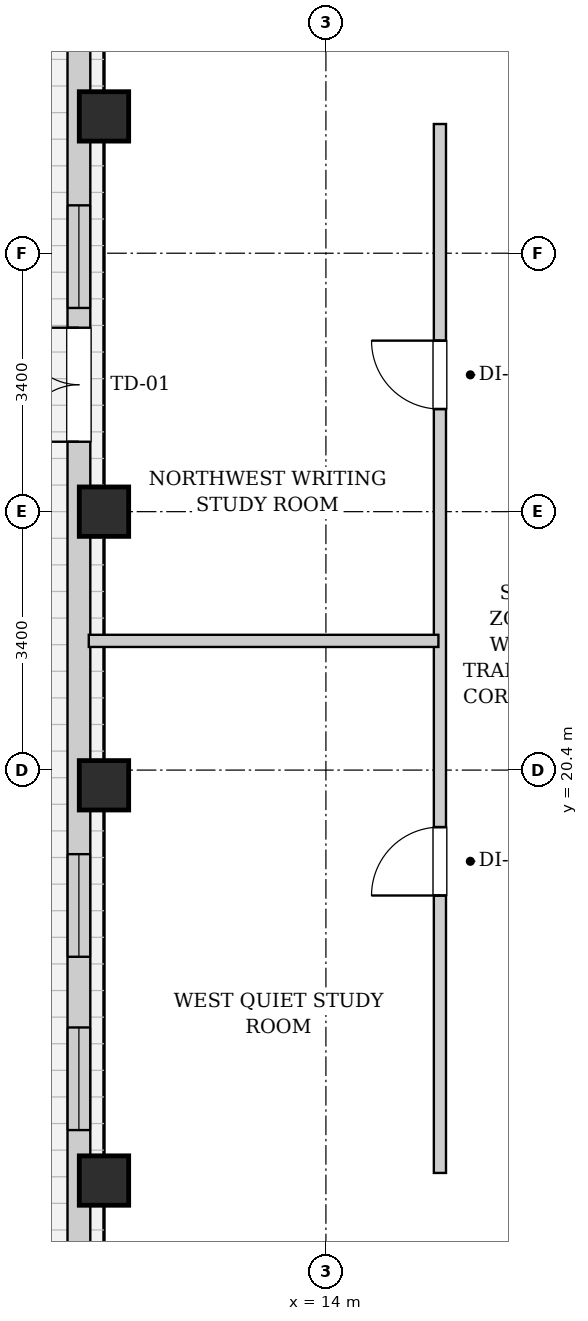
"""IFC4 building model, lengths in metres.
Left out: names, types, materials, properties, quantities, classifications, styles, units other than length and angle.
Written with IfcOpenShell. Run it as: python <this file> out.ifc"""

import sys

from ifc_helpers import new_model, si_unit, direction, frame, frame_2d, origin, origin_2d, place, context, subcontext, project, spatial, rectangle, extrude, element, fill, save


model = new_model("IFC4")
c1 = context("Model", 3, precision=1e-05, world=origin(), true_north=direction((0.0, 1.0)))
c2 = subcontext(c1, "Body", "Model", "MODEL_VIEW")
j1 = project(units=[si_unit("LENGTHUNIT", "METRE"), si_unit("PLANEANGLEUNIT", "RADIAN")], contexts=[c1])
p1 = place(None, origin())
s1 = spatial("IfcSite", under=j1, at=p1, CompositionType="ELEMENT")
p2 = place(p1, origin())
s2 = spatial("IfcBuilding", under=s1, at=p2, CompositionType="ELEMENT")
p3 = place(p2, frame((0.0, 0.0, 174.4)))
s3 = spatial("IfcBuildingStorey", under=s2, at=p3, CompositionType="ELEMENT", Elevation=174.4)
for number, where, z_axis, x_axis in (
    (1, (11.08, 15.0, 0.0), (0.0, 0.0, 1.0), (1.0, 0.0, 0.0)),
    (2, (11.08, 20.2, 0.0), (0.0, 0.0, 1.0), (1.0, 0.0, 0.0)),
    (3, (11.08, 23.8, 0.0), (0.0, 0.0, 1.0), (1.0, 0.0, 0.0)),
    (4, (11.08, 29.0, 0.0), (0.0, 0.0, 1.0), (1.0, 0.0, 0.0)),
):
    element("IfcColumn", number, at=place(p3, frame(where, z_axis=z_axis, x_axis=x_axis)), inside=s3, PredefinedType="COLUMN", context=c2, shape_type="SweptSolid", body=[
        extrude(rectangle(XDim=0.65, YDim=0.65, at=origin_2d()), origin(), (0.0, 0.0, 1.0), 3.3),
    ])
p4 = place(p3, frame((10.75, 6.3, 0.0), z_axis=(0.0, 0.0, 1.0), x_axis=(0.0, 1.0, 0.0)))
e5 = element("IfcWall", 5, at=p4, inside=s3, PredefinedType="SOLIDWALL", context=c2, shape_type="SweptSolid", body=[
    extrude(rectangle(XDim=31.4, YDim=0.3, at=frame_2d((15.7, 0.0))), origin(), (0.0, 0.0, 1.0), 3.04),
])
p5 = place(p4, frame((18.42, 0.0, 0.0)))
e6 = element("IfcOpeningElement", 6, at=p5, cuts=e5, PredefinedType="OPENING", context=c2, shape_type="SweptSolid", body=[
    extrude(rectangle(XDim=1.5, YDim=1.982, at=frame_2d((0.75, 0.991))), frame((0.0, 0.16, 0.0), z_axis=(0.0, -1.0, 0.0), x_axis=(1.0, 0.0, 0.0)), (0.0, 0.0, 1.0), 0.32),
])
p6 = place(p4, frame((11.644, 0.0, 0.55)))
e7 = element("IfcOpeningElement", 7, at=p6, cuts=e5, PredefinedType="OPENING", context=c2, shape_type="SweptSolid", body=[
    extrude(rectangle(XDim=1.35, YDim=1.2, at=frame_2d((0.675, 0.6))), frame((0.0, 0.16, 0.0), z_axis=(0.0, -1.0, 0.0), x_axis=(1.0, 0.0, 0.0)), (0.0, 0.0, 1.0), 0.32),
])
p7 = place(p4, frame((9.364, 0.0, 0.55)))
e8 = element("IfcOpeningElement", 8, at=p7, cuts=e5, PredefinedType="OPENING", context=c2, shape_type="SweptSolid", body=[
    extrude(rectangle(XDim=1.35, YDim=1.2, at=frame_2d((0.675, 0.6))), frame((0.0, 0.16, 0.0), z_axis=(0.0, -1.0, 0.0), x_axis=(1.0, 0.0, 0.0)), (0.0, 0.0, 1.0), 0.32),
])
p8 = place(p4, frame((20.18, 0.0, 0.55)))
e9 = element("IfcOpeningElement", 9, at=p8, cuts=e5, PredefinedType="OPENING", context=c2, shape_type="SweptSolid", body=[
    extrude(rectangle(XDim=1.35, YDim=1.2, at=frame_2d((0.675, 0.6))), frame((0.0, 0.16, 0.0), z_axis=(0.0, -1.0, 0.0), x_axis=(1.0, 0.0, 0.0)), (0.0, 0.0, 1.0), 0.32),
])
p9 = place(p3, frame((15.5, 15.1, 0.0), z_axis=(0.0, 0.0, 1.0), x_axis=(0.0, 1.0, 0.0)))
e10 = element("IfcWall", 10, at=p9, inside=s3, PredefinedType="PARTITIONING", context=c2, shape_type="SweptSolid", body=[
    extrude(rectangle(XDim=13.8, YDim=0.16, at=frame_2d((6.9, 0.0))), origin(), (0.0, 0.0, 1.0), 3.04),
])
p10 = place(p9, frame((3.65, 0.0, 0.0)))
e11 = element("IfcOpeningElement", 11, at=p10, cuts=e10, PredefinedType="OPENING", context=c2, shape_type="SweptSolid", body=[
    extrude(rectangle(XDim=0.9, YDim=2.05, at=frame_2d((0.45, 1.025))), frame((0.0, 0.09, 0.0), z_axis=(0.0, -1.0, 0.0), x_axis=(1.0, 0.0, 0.0)), (0.0, 0.0, 1.0), 0.18),
])
p11 = place(p9, frame((10.05, 0.0, 0.0)))
e12 = element("IfcOpeningElement", 12, at=p11, cuts=e10, PredefinedType="OPENING", context=c2, shape_type="SweptSolid", body=[
    extrude(rectangle(XDim=0.9, YDim=2.05, at=frame_2d((0.45, 1.025))), frame((0.0, 0.09, 0.0), z_axis=(0.0, -1.0, 0.0), x_axis=(1.0, 0.0, 0.0)), (0.0, 0.0, 1.0), 0.18),
])
p12 = place(p3, frame((10.88, 22.1, 0.0), z_axis=(0.0, 0.0, 1.0), x_axis=(1.0, 0.0, 0.0)))
e13 = element("IfcWall", 13, at=p12, inside=s3, PredefinedType="PARTITIONING", context=c2, shape_type="SweptSolid", body=[
    extrude(rectangle(XDim=4.6, YDim=0.16, at=frame_2d((2.3, 0.0))), origin(), (0.0, 0.0, 1.0), 3.04),
])
p13 = place(p10, origin())
e14 = element("IfcDoor", 14, at=p13, inside=s3, OperationType="SINGLE_SWING_LEFT", PredefinedType="DOOR", context=c2, shape_type="SweptSolid", body=[
    extrude(rectangle(XDim=0.9, YDim=2.05, at=frame_2d((0.45, 1.025))), frame((0.0, 0.025, 0.0), z_axis=(0.0, -1.0, 0.0), x_axis=(1.0, 0.0, 0.0)), (0.0, 0.0, 1.0), 0.05),
])
fill(e11, e14)
p14 = place(p11, origin())
e15 = element("IfcDoor", 15, at=p14, inside=s3, OperationType="SINGLE_SWING_RIGHT", PredefinedType="DOOR", context=c2, shape_type="SweptSolid", body=[
    extrude(rectangle(XDim=0.9, YDim=2.05, at=frame_2d((0.45, 1.025))), frame((0.0, 0.025, 0.0), z_axis=(0.0, -1.0, 0.0), x_axis=(1.0, 0.0, 0.0)), (0.0, 0.0, 1.0), 0.05),
])
fill(e12, e15)
p15 = place(p5, origin())
e16 = element("IfcDoor", 16, at=p15, inside=s3, OperationType="DOUBLE_SWING_LEFT", PredefinedType="DOOR", context=c2, shape_type="SweptSolid", body=[
    extrude(rectangle(XDim=1.5, YDim=1.982, at=frame_2d((0.75, 0.991))), frame((0.0, 0.025, 0.0), z_axis=(0.0, -1.0, 0.0), x_axis=(1.0, 0.0, 0.0)), (0.0, 0.0, 1.0), 0.05),
])
fill(e6, e16)
p16 = place(p6, origin())
e17 = element("IfcWindow", 17, at=p16, inside=s3, PartitioningType="SINGLE_PANEL", PredefinedType="WINDOW", context=c2, shape_type="SweptSolid", body=[
    extrude(rectangle(XDim=1.35, YDim=1.2, at=frame_2d((0.675, 0.6))), frame((0.0, 0.03, 0.0), z_axis=(0.0, -1.0, 0.0), x_axis=(1.0, 0.0, 0.0)), (0.0, 0.0, 1.0), 0.06),
])
fill(e7, e17)
p17 = place(p7, origin())
e18 = element("IfcWindow", 18, at=p17, inside=s3, PartitioningType="SINGLE_PANEL", PredefinedType="WINDOW", context=c2, shape_type="SweptSolid", body=[
    extrude(rectangle(XDim=1.35, YDim=1.2, at=frame_2d((0.675, 0.6))), frame((0.0, 0.03, 0.0), z_axis=(0.0, -1.0, 0.0), x_axis=(1.0, 0.0, 0.0)), (0.0, 0.0, 1.0), 0.06),
])
fill(e8, e18)
p18 = place(p8, origin())
e19 = element("IfcWindow", 19, at=p18, inside=s3, PartitioningType="SINGLE_PANEL", PredefinedType="WINDOW", context=c2, shape_type="SweptSolid", body=[
    extrude(rectangle(XDim=1.35, YDim=1.2, at=frame_2d((0.675, 0.6))), frame((0.0, 0.03, 0.0), z_axis=(0.0, -1.0, 0.0), x_axis=(1.0, 0.0, 0.0)), (0.0, 0.0, 1.0), 0.06),
])
fill(e9, e19)
save(model, sys.argv[1])
